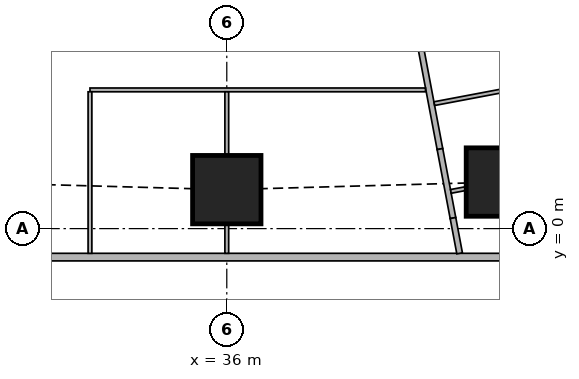
"""IFC4 building model, lengths in metres.
Left out: names, types, materials, properties, quantities, classifications, styles, units other than length and angle.
Written with IfcOpenShell. Run it as: python <this file> out.ifc"""

import sys

from ifc_helpers import new_model, si_unit, direction, frame, frame_2d, origin, origin_2d, place, context, subcontext, project, spatial, rectangle, extrude, element, fill, save


model = new_model("IFC4")
c1 = context("Model", 3, precision=1e-05, world=origin(), true_north=direction((0.0, 1.0)))
c2 = subcontext(c1, "Body", "Model", "MODEL_VIEW")
j1 = project(units=[si_unit("LENGTHUNIT", "METRE"), si_unit("PLANEANGLEUNIT", "RADIAN")], contexts=[c1])
p1 = place(None, origin())
s1 = spatial("IfcSite", under=j1, at=p1, CompositionType="ELEMENT")
p2 = place(p1, origin())
s2 = spatial("IfcBuilding", under=s1, at=p2, CompositionType="ELEMENT")
p3 = place(p2, frame((0.0, 0.0, 169.55)))
s3 = spatial("IfcBuildingStorey", under=s2, at=p3, CompositionType="ELEMENT", Elevation=169.55)
for number, where, z_axis, x_axis in (
    (1, (36.0, 1.025, 0.0), (0.0, 0.0, 1.0), (1.0, 0.0, 0.0)),
    (2, (43.2, 1.225, 0.0), (0.0, 0.0, 1.0), (1.0, 0.0, 0.0)),
):
    element("IfcColumn", number, at=place(p3, frame(where, z_axis=z_axis, x_axis=x_axis)), inside=s3, PredefinedType="COLUMN", context=c2, shape_type="SweptSolid", body=[
        extrude(rectangle(XDim=1.8, YDim=1.8, at=origin_2d()), origin(), (0.0, 0.0, 1.0), 3.75),
    ])
p4 = place(p3, frame((2.163, -0.75, 0.0), z_axis=(0.0, 0.0, 1.0), x_axis=(1.0, 0.0, 0.0)))
e3 = element("IfcWall", 3, at=p4, inside=s3, PredefinedType="SOLIDWALL", context=c2, shape_type="SweptSolid", body=[
    extrude(rectangle(XDim=45.628, YDim=0.2, at=frame_2d((22.814, 0.0))), origin(), (0.0, 0.0, 1.0), 3.5),
])
p5 = place(p4, frame((9.537, 0.0, 0.9)))
e4 = element("IfcOpeningElement", 4, at=p5, cuts=e3, PredefinedType="OPENING", context=c2, shape_type="SweptSolid", body=[
    extrude(rectangle(XDim=1.8, YDim=1.5, at=frame_2d((0.9, 0.75))), frame((0.0, 0.11, 0.0), z_axis=(0.0, -1.0, 0.0), x_axis=(1.0, 0.0, 0.0)), (0.0, 0.0, 1.0), 0.22),
])
p6 = place(p4, frame((13.137, 0.0, 0.9)))
e5 = element("IfcOpeningElement", 5, at=p6, cuts=e3, PredefinedType="OPENING", context=c2, shape_type="SweptSolid", body=[
    extrude(rectangle(XDim=1.8, YDim=1.5, at=frame_2d((0.9, 0.75))), frame((0.0, 0.11, 0.0), z_axis=(0.0, -1.0, 0.0), x_axis=(1.0, 0.0, 0.0)), (0.0, 0.0, 1.0), 0.22),
])
p7 = place(p4, frame((16.737, 0.0, 0.9)))
e6 = element("IfcOpeningElement", 6, at=p7, cuts=e3, PredefinedType="OPENING", context=c2, shape_type="SweptSolid", body=[
    extrude(rectangle(XDim=1.8, YDim=1.5, at=frame_2d((0.9, 0.75))), frame((0.0, 0.11, 0.0), z_axis=(0.0, -1.0, 0.0), x_axis=(1.0, 0.0, 0.0)), (0.0, 0.0, 1.0), 0.22),
])
p8 = place(p4, frame((20.337, 0.0, 0.9)))
e7 = element("IfcOpeningElement", 7, at=p8, cuts=e3, PredefinedType="OPENING", context=c2, shape_type="SweptSolid", body=[
    extrude(rectangle(XDim=1.8, YDim=1.5, at=frame_2d((0.9, 0.75))), frame((0.0, 0.11, 0.0), z_axis=(0.0, -1.0, 0.0), x_axis=(1.0, 0.0, 0.0)), (0.0, 0.0, 1.0), 0.22),
])
p9 = place(p4, frame((23.937, 0.0, 0.9)))
e8 = element("IfcOpeningElement", 8, at=p9, cuts=e3, PredefinedType="OPENING", context=c2, shape_type="SweptSolid", body=[
    extrude(rectangle(XDim=1.8, YDim=1.5, at=frame_2d((0.9, 0.75))), frame((0.0, 0.11, 0.0), z_axis=(0.0, -1.0, 0.0), x_axis=(1.0, 0.0, 0.0)), (0.0, 0.0, 1.0), 0.22),
])
p10 = place(p4, frame((27.537, 0.0, 0.9)))
e9 = element("IfcOpeningElement", 9, at=p10, cuts=e3, PredefinedType="OPENING", context=c2, shape_type="SweptSolid", body=[
    extrude(rectangle(XDim=1.8, YDim=1.5, at=frame_2d((0.9, 0.75))), frame((0.0, 0.11, 0.0), z_axis=(0.0, -1.0, 0.0), x_axis=(1.0, 0.0, 0.0)), (0.0, 0.0, 1.0), 0.22),
])
p11 = place(p4, frame((31.137, 0.0, 0.9)))
e10 = element("IfcOpeningElement", 10, at=p11, cuts=e3, PredefinedType="OPENING", context=c2, shape_type="SweptSolid", body=[
    extrude(rectangle(XDim=1.8, YDim=1.5, at=frame_2d((0.9, 0.75))), frame((0.0, 0.11, 0.0), z_axis=(0.0, -1.0, 0.0), x_axis=(1.0, 0.0, 0.0)), (0.0, 0.0, 1.0), 0.22),
])
p12 = place(p4, frame((34.737, 0.0, 0.9)))
e11 = element("IfcOpeningElement", 11, at=p12, cuts=e3, PredefinedType="OPENING", context=c2, shape_type="SweptSolid", body=[
    extrude(rectangle(XDim=1.8, YDim=1.5, at=frame_2d((0.9, 0.75))), frame((0.0, 0.11, 0.0), z_axis=(0.0, -1.0, 0.0), x_axis=(1.0, 0.0, 0.0)), (0.0, 0.0, 1.0), 0.22),
])
p13 = place(p3, frame((50.653, 2.703, 0.0), z_axis=(0.0, 0.0, 1.0), x_axis=(-0.185612026696, 0.982623109613, 0.0)))
e12 = element("IfcWall", 12, at=p13, inside=s3, PredefinedType="SOLIDWALL", context=c2, shape_type="SweptSolid", body=[
    extrude(rectangle(XDim=41.393, YDim=0.2, at=frame_2d((20.697, 0.0))), origin(), (0.0, 0.0, 1.0), 3.5),
])
p14 = place(p13, frame((1.633, 0.0, 0.9)))
e13 = element("IfcOpeningElement", 13, at=p14, cuts=e12, PredefinedType="OPENING", context=c2, shape_type="SweptSolid", body=[
    extrude(rectangle(XDim=1.8, YDim=1.5, at=frame_2d((0.9, 0.75))), frame((0.0, 0.11, 0.0), z_axis=(0.0, -1.0, 0.0), x_axis=(1.0, 0.0, 0.0)), (0.0, 0.0, 1.0), 0.22),
])
p15 = place(p13, frame((6.032, 0.0, 0.9)))
e14 = element("IfcOpeningElement", 14, at=p15, cuts=e12, PredefinedType="OPENING", context=c2, shape_type="SweptSolid", body=[
    extrude(rectangle(XDim=1.8, YDim=1.5, at=frame_2d((0.9, 0.75))), frame((0.0, 0.11, 0.0), z_axis=(0.0, -1.0, 0.0), x_axis=(1.0, 0.0, 0.0)), (0.0, 0.0, 1.0), 0.22),
])
p16 = place(p13, frame((9.848, 0.0, 0.9)))
e15 = element("IfcOpeningElement", 15, at=p16, cuts=e12, PredefinedType="OPENING", context=c2, shape_type="SweptSolid", body=[
    extrude(rectangle(XDim=1.8, YDim=1.5, at=frame_2d((0.9, 0.75))), frame((0.0, 0.11, 0.0), z_axis=(0.0, -1.0, 0.0), x_axis=(1.0, 0.0, 0.0)), (0.0, 0.0, 1.0), 0.22),
])
p17 = place(p13, frame((13.664, 0.0, 0.9)))
e16 = element("IfcOpeningElement", 16, at=p17, cuts=e12, PredefinedType="OPENING", context=c2, shape_type="SweptSolid", body=[
    extrude(rectangle(XDim=1.8, YDim=1.5, at=frame_2d((0.9, 0.75))), frame((0.0, 0.11, 0.0), z_axis=(0.0, -1.0, 0.0), x_axis=(1.0, 0.0, 0.0)), (0.0, 0.0, 1.0), 0.22),
])
p18 = place(p13, frame((17.481, 0.0, 0.9)))
e17 = element("IfcOpeningElement", 17, at=p18, cuts=e12, PredefinedType="OPENING", context=c2, shape_type="SweptSolid", body=[
    extrude(rectangle(XDim=1.8, YDim=1.5, at=frame_2d((0.9, 0.75))), frame((0.0, 0.11, 0.0), z_axis=(0.0, -1.0, 0.0), x_axis=(1.0, 0.0, 0.0)), (0.0, 0.0, 1.0), 0.22),
])
p19 = place(p13, frame((21.297, 0.0, 0.9)))
e18 = element("IfcOpeningElement", 18, at=p19, cuts=e12, PredefinedType="OPENING", context=c2, shape_type="SweptSolid", body=[
    extrude(rectangle(XDim=1.8, YDim=1.5, at=frame_2d((0.9, 0.75))), frame((0.0, 0.11, 0.0), z_axis=(0.0, -1.0, 0.0), x_axis=(1.0, 0.0, 0.0)), (0.0, 0.0, 1.0), 0.22),
])
p20 = place(p13, frame((25.113, 0.0, 0.9)))
e19 = element("IfcOpeningElement", 19, at=p20, cuts=e12, PredefinedType="OPENING", context=c2, shape_type="SweptSolid", body=[
    extrude(rectangle(XDim=1.8, YDim=1.5, at=frame_2d((0.9, 0.75))), frame((0.0, 0.11, 0.0), z_axis=(0.0, -1.0, 0.0), x_axis=(1.0, 0.0, 0.0)), (0.0, 0.0, 1.0), 0.22),
])
p21 = place(p13, frame((28.93, 0.0, 0.9)))
e20 = element("IfcOpeningElement", 20, at=p21, cuts=e12, PredefinedType="OPENING", context=c2, shape_type="SweptSolid", body=[
    extrude(rectangle(XDim=1.8, YDim=1.5, at=frame_2d((0.9, 0.75))), frame((0.0, 0.11, 0.0), z_axis=(0.0, -1.0, 0.0), x_axis=(1.0, 0.0, 0.0)), (0.0, 0.0, 1.0), 0.22),
])
p22 = place(p13, frame((32.746, 0.0, 0.9)))
e21 = element("IfcOpeningElement", 21, at=p22, cuts=e12, PredefinedType="OPENING", context=c2, shape_type="SweptSolid", body=[
    extrude(rectangle(XDim=1.8, YDim=1.5, at=frame_2d((0.9, 0.75))), frame((0.0, 0.11, 0.0), z_axis=(0.0, -1.0, 0.0), x_axis=(1.0, 0.0, 0.0)), (0.0, 0.0, 1.0), 0.22),
])
p23 = place(p13, frame((36.481, 0.0, 0.9)))
e22 = element("IfcOpeningElement", 22, at=p23, cuts=e12, PredefinedType="OPENING", context=c2, shape_type="SweptSolid", body=[
    extrude(rectangle(XDim=1.8, YDim=1.5, at=frame_2d((0.9, 0.75))), frame((0.0, 0.11, 0.0), z_axis=(0.0, -1.0, 0.0), x_axis=(1.0, 0.0, 0.0)), (0.0, 0.0, 1.0), 0.22),
])
p24 = place(p3, frame((33.877, 43.029, 0.0), z_axis=(0.0, 0.0, 1.0), x_axis=(0.185596841028, -0.98262597798, 0.0)))
e23 = element("IfcWall", 23, at=p24, inside=s3, PredefinedType="SOLIDWALL", context=c2, shape_type="SweptSolid", body=[
    extrude(rectangle(XDim=41.66, YDim=0.15, at=frame_2d((20.83, 0.0))), origin(), (0.0, 0.0, 1.0), 2.5),
])
p25 = place(p24, frame((8.63, 0.0, 0.0)))
e24 = element("IfcOpeningElement", 24, at=p25, cuts=e23, PredefinedType="OPENING", context=c2, shape_type="SweptSolid", body=[
    extrude(rectangle(XDim=1.0, YDim=2.1, at=frame_2d((0.5, 1.05))), frame((0.0, 0.085, 0.0), z_axis=(0.0, -1.0, 0.0), x_axis=(1.0, 0.0, 0.0)), (0.0, 0.0, 1.0), 0.17),
])
p26 = place(p24, frame((13.841, 0.0, 0.0)))
e25 = element("IfcOpeningElement", 25, at=p26, cuts=e23, PredefinedType="OPENING", context=c2, shape_type="SweptSolid", body=[
    extrude(rectangle(XDim=1.0, YDim=2.1, at=frame_2d((0.5, 1.05))), frame((0.0, 0.085, 0.0), z_axis=(0.0, -1.0, 0.0), x_axis=(1.0, 0.0, 0.0)), (0.0, 0.0, 1.0), 0.17),
])
p27 = place(p24, frame((21.474, 0.0, 0.0)))
e26 = element("IfcOpeningElement", 26, at=p27, cuts=e23, PredefinedType="OPENING", context=c2, shape_type="SweptSolid", body=[
    extrude(rectangle(XDim=1.0, YDim=2.1, at=frame_2d((0.5, 1.05))), frame((0.0, 0.085, 0.0), z_axis=(0.0, -1.0, 0.0), x_axis=(1.0, 0.0, 0.0)), (0.0, 0.0, 1.0), 0.17),
])
p28 = place(p24, frame((30.4, 0.0, 0.0)))
e27 = element("IfcOpeningElement", 27, at=p28, cuts=e23, PredefinedType="OPENING", context=c2, shape_type="SweptSolid", body=[
    extrude(rectangle(XDim=1.0, YDim=2.1, at=frame_2d((0.5, 1.05))), frame((0.0, 0.085, 0.0), z_axis=(0.0, -1.0, 0.0), x_axis=(1.0, 0.0, 0.0)), (0.0, 0.0, 1.0), 0.17),
])
p29 = place(p24, frame((32.288, 0.0, 0.0)))
e28 = element("IfcOpeningElement", 28, at=p29, cuts=e23, PredefinedType="OPENING", context=c2, shape_type="SweptSolid", body=[
    extrude(rectangle(XDim=1.0, YDim=2.1, at=frame_2d((0.5, 1.05))), frame((0.0, 0.085, 0.0), z_axis=(0.0, -1.0, 0.0), x_axis=(1.0, 0.0, 0.0)), (0.0, 0.0, 1.0), 0.17),
])
p30 = place(p3, frame((41.609, 2.093, 0.0), z_axis=(0.0, 0.0, 1.0), x_axis=(0.185708872674, -0.982604811005, 0.0)))
e29 = element("IfcWall", 29, at=p30, inside=s3, PredefinedType="SOLIDWALL", context=c2, shape_type="SweptSolid", body=[
    extrude(rectangle(XDim=1.847, YDim=0.15, at=frame_2d((0.924, 0.0))), origin(), (0.0, 0.0, 1.0), 2.1),
])
p31 = place(p3, frame((41.952, 0.278, 0.0), z_axis=(0.0, 0.0, 1.0), x_axis=(0.185365466984, -0.982669651332, 0.0)))
e30 = element("IfcWall", 30, at=p31, inside=s3, PredefinedType="SOLIDWALL", context=c2, shape_type="SweptSolid", body=[
    extrude(rectangle(XDim=0.944, YDim=0.15, at=frame_2d((0.472, 0.0))), origin(), (0.0, 0.0, 1.0), 3.5),
])
p32 = place(p3, frame((41.229, 3.65, 0.0), z_axis=(0.0, 0.0, 1.0), x_axis=(-1.0, 0.0, 0.0)))
e31 = element("IfcWall", 31, at=p32, inside=s3, PredefinedType="PARTITIONING", context=c2, shape_type="SweptSolid", body=[
    extrude(rectangle(XDim=8.829, YDim=0.1, at=frame_2d((4.415, 0.0))), origin(), (0.0, 0.0, 1.0), 3.5),
])
p33 = place(p32, frame((6.53, 0.0, 0.0)))
e32 = element("IfcOpeningElement", 32, at=p33, cuts=e31, PredefinedType="OPENING", context=c2, shape_type="SweptSolid", body=[
    extrude(rectangle(XDim=0.9, YDim=2.1, at=frame_2d((0.45, 1.05))), frame((0.0, 0.06, 0.0), z_axis=(0.0, -1.0, 0.0), x_axis=(1.0, 0.0, 0.0)), (0.0, 0.0, 1.0), 0.12),
])
p34 = place(p32, frame((4.129, 0.0, 0.0)))
e33 = element("IfcOpeningElement", 33, at=p34, cuts=e31, PredefinedType="OPENING", context=c2, shape_type="SweptSolid", body=[
    extrude(rectangle(XDim=0.9, YDim=2.1, at=frame_2d((0.45, 1.05))), frame((0.0, 0.06, 0.0), z_axis=(0.0, -1.0, 0.0), x_axis=(1.0, 0.0, 0.0)), (0.0, 0.0, 1.0), 0.12),
])
p35 = place(p3, frame((32.4, -0.65, 0.0), z_axis=(0.0, 0.0, 1.0), x_axis=(0.0, 1.0, 0.0)))
e34 = element("IfcWall", 34, at=p35, inside=s3, PredefinedType="PARTITIONING", context=c2, shape_type="SweptSolid", body=[
    extrude(rectangle(XDim=4.25, YDim=0.1, at=frame_2d((2.125, 0.0))), origin(), (0.0, 0.0, 1.0), 2.1),
])
p36 = place(p3, frame((36.0, -0.65, 0.0), z_axis=(0.0, 0.0, 1.0), x_axis=(0.0, 1.0, 0.0)))
e35 = element("IfcWall", 35, at=p36, inside=s3, PredefinedType="PARTITIONING", context=c2, shape_type="SweptSolid", body=[
    extrude(rectangle(XDim=0.774, YDim=0.1, at=frame_2d((0.387, 0.0))), origin(), (0.0, 0.0, 1.0), 3.5),
])
p37 = place(p3, frame((36.0, 1.926, 0.0), z_axis=(0.0, 0.0, 1.0), x_axis=(0.0, 1.0, 0.0)))
e36 = element("IfcWall", 36, at=p37, inside=s3, PredefinedType="PARTITIONING", context=c2, shape_type="SweptSolid", body=[
    extrude(rectangle(XDim=1.674, YDim=0.1, at=frame_2d((0.837, 0.0))), origin(), (0.0, 0.0, 1.0), 3.5),
])
p38 = place(p3, frame((42.29, 1.053, 0.0), z_axis=(0.0, 0.0, 1.0), x_axis=(-0.982830800147, -0.184509127909, 0.0)))
e37 = element("IfcWall", 37, at=p38, inside=s3, PredefinedType="PARTITIONING", context=c2, shape_type="SweptSolid", body=[
    extrude(rectangle(XDim=0.401, YDim=0.1, at=frame_2d((0.2, 0.0))), origin(), (0.0, 0.0, 1.0), 2.1),
])
p39 = place(p3, frame((44.677, 3.896, 0.0), z_axis=(0.0, 0.0, 1.0), x_axis=(-0.982610347627, -0.185679575441, 0.0)))
e38 = element("IfcWall", 38, at=p39, inside=s3, PredefinedType="PARTITIONING", context=c2, shape_type="SweptSolid", body=[
    extrude(rectangle(XDim=3.274, YDim=0.1, at=frame_2d((1.637, 0.0))), origin(), (0.0, 0.0, 1.0), 3.5),
])
p40 = place(p10, origin())
e39 = element("IfcWindow", 39, at=p40, inside=s3, PartitioningType="SINGLE_PANEL", PredefinedType="WINDOW", context=c2, shape_type="SweptSolid", body=[
    extrude(rectangle(XDim=1.8, YDim=1.5, at=frame_2d((0.9, 0.75))), frame((0.0, 0.03, 0.0), z_axis=(0.0, -1.0, 0.0), x_axis=(1.0, 0.0, 0.0)), (0.0, 0.0, 1.0), 0.06),
])
fill(e9, e39)
p41 = place(p11, origin())
e40 = element("IfcWindow", 40, at=p41, inside=s3, PartitioningType="SINGLE_PANEL", PredefinedType="WINDOW", context=c2, shape_type="SweptSolid", body=[
    extrude(rectangle(XDim=1.8, YDim=1.5, at=frame_2d((0.9, 0.75))), frame((0.0, 0.03, 0.0), z_axis=(0.0, -1.0, 0.0), x_axis=(1.0, 0.0, 0.0)), (0.0, 0.0, 1.0), 0.06),
])
fill(e10, e40)
p42 = place(p12, origin())
e41 = element("IfcWindow", 41, at=p42, inside=s3, PartitioningType="SINGLE_PANEL", PredefinedType="WINDOW", context=c2, shape_type="SweptSolid", body=[
    extrude(rectangle(XDim=1.8, YDim=1.5, at=frame_2d((0.9, 0.75))), frame((0.0, 0.03, 0.0), z_axis=(0.0, -1.0, 0.0), x_axis=(1.0, 0.0, 0.0)), (0.0, 0.0, 1.0), 0.06),
])
fill(e11, e41)
p43 = place(p33, origin())
e42 = element("IfcDoor", 42, at=p43, inside=s3, OperationType="SINGLE_SWING_RIGHT", PredefinedType="DOOR", context=c2, shape_type="SweptSolid", body=[
    extrude(rectangle(XDim=0.9, YDim=2.1, at=frame_2d((0.45, 1.05))), frame((0.0, 0.025, 0.0), z_axis=(0.0, -1.0, 0.0), x_axis=(1.0, 0.0, 0.0)), (0.0, 0.0, 1.0), 0.05),
])
fill(e32, e42)
p44 = place(p34, origin())
e43 = element("IfcDoor", 43, at=p44, inside=s3, OperationType="SINGLE_SWING_RIGHT", PredefinedType="DOOR", context=c2, shape_type="SweptSolid", body=[
    extrude(rectangle(XDim=0.9, YDim=2.1, at=frame_2d((0.45, 1.05))), frame((0.0, 0.025, 0.0), z_axis=(0.0, -1.0, 0.0), x_axis=(1.0, 0.0, 0.0)), (0.0, 0.0, 1.0), 0.05),
])
fill(e33, e43)
save(model, sys.argv[1])
